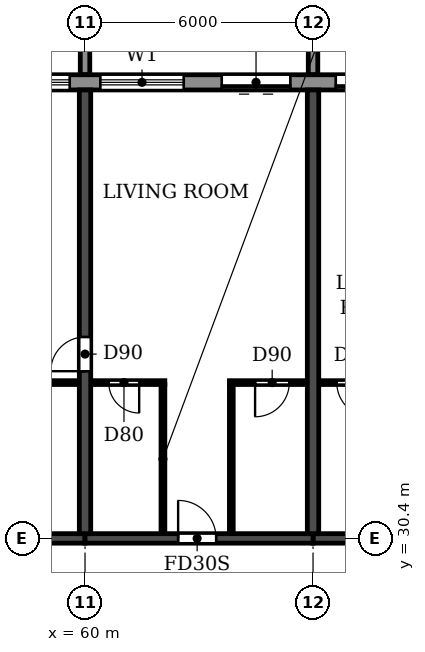
"""IFC4 building model, lengths in metres.
Left out: names, types, materials, properties, quantities, classifications, styles, units other than length and angle.
Written with IfcOpenShell. Run it as: python <this file> out.ifc"""

import sys

from ifc_helpers import new_model, si_unit, direction, frame, frame_2d, origin, place, context, subcontext, project, spatial, polyline, rectangle, outline, extrude, source, transform, mapped, element, fill, save


model = new_model("IFC4")
c1 = context("Model", 3, precision=1e-05, world=origin(), true_north=direction((0.0, 1.0)))
c2 = subcontext(c1, "Body", "Model", "MODEL_VIEW")
j1 = project(units=[si_unit("LENGTHUNIT", "METRE"), si_unit("PLANEANGLEUNIT", "RADIAN")], contexts=[c1])
p1 = place(None, origin())
s1 = spatial("IfcSite", under=j1, at=p1, CompositionType="ELEMENT")
p2 = place(p1, origin())
s2 = spatial("IfcBuilding", under=s1, at=p2, CompositionType="ELEMENT")
p3 = place(p2, frame((0.0, 0.0, 122.4)))
s3 = spatial("IfcBuildingStorey", under=s2, at=p3, CompositionType="ELEMENT", Elevation=122.4)
p4 = place(p3, frame((60.0, 30.525, 0.0), z_axis=(0.0, 0.0, 1.0), x_axis=(0.0, 1.0, 0.0)))
e1 = element("IfcWall", 1, at=p4, inside=s3, PredefinedType="SHEAR", context=c2, shape_type="SweptSolid", body=[
    extrude(rectangle(XDim=11.675, YDim=0.3, at=frame_2d((5.837, 0.0))), origin(), (0.0, 0.0, 1.0), 3.07),
])
p5 = place(p4, frame((4.275, 0.0, 0.0)))
e2 = element("IfcOpeningElement", 2, at=p5, cuts=e1, PredefinedType="OPENING", context=c2, shape_type="SweptSolid", body=[
    extrude(rectangle(XDim=0.9, YDim=2.1, at=frame_2d((0.45, 1.05))), frame((0.0, 0.16, 0.0), z_axis=(0.0, -1.0, 0.0), x_axis=(1.0, 0.0, 0.0)), (0.0, 0.0, 1.0), 0.32),
])
p6 = place(p3, frame((66.0, 30.525, 0.0), z_axis=(0.0, 0.0, 1.0), x_axis=(0.0, 1.0, 0.0)))
e3 = element("IfcWall", 3, at=p6, inside=s3, PredefinedType="SHEAR", context=c2, shape_type="SweptSolid", body=[
    extrude(rectangle(XDim=11.675, YDim=0.3, at=frame_2d((5.837, 0.0))), origin(), (0.0, 0.0, 1.0), 3.07),
])
p7 = place(p3, frame((54.0, 30.4, 0.0), z_axis=(0.0, 0.0, 1.0), x_axis=(1.0, 0.0, 0.0)))
e4 = element("IfcWall", 4, at=p7, inside=s3, PredefinedType="SHEAR", context=c2, shape_type="SweptSolid", body=[
    extrude(rectangle(XDim=6.0, YDim=0.25, at=frame_2d((3.0, 0.0))), origin(), (0.0, 0.0, 1.0), 2.47),
])
p8 = place(p3, frame((60.0, 30.4, 0.0), z_axis=(0.0, 0.0, 1.0), x_axis=(1.0, 0.0, 0.0)))
e5 = element("IfcWall", 5, at=p8, inside=s3, PredefinedType="SHEAR", context=c2, shape_type="SweptSolid", body=[
    extrude(rectangle(XDim=6.0, YDim=0.25, at=frame_2d((3.0, 0.0))), origin(), (0.0, 0.0, 1.0), 2.47),
])
p9 = place(p8, frame((2.45, 0.0, 0.0)))
e6 = element("IfcOpeningElement", 6, at=p9, cuts=e5, PredefinedType="OPENING", context=c2, shape_type="SweptSolid", body=[
    extrude(rectangle(XDim=1.0, YDim=2.1, at=frame_2d((0.5, 1.05))), frame((0.0, 0.135, 0.0), z_axis=(0.0, -1.0, 0.0), x_axis=(1.0, 0.0, 0.0)), (0.0, 0.0, 1.0), 0.27),
])
p10 = place(p3, frame((66.0, 30.4, 0.0), z_axis=(0.0, 0.0, 1.0), x_axis=(1.0, 0.0, 0.0)))
e7 = element("IfcWall", 7, at=p10, inside=s3, PredefinedType="SHEAR", context=c2, shape_type="SweptSolid", body=[
    extrude(rectangle(XDim=6.0, YDim=0.25, at=frame_2d((3.0, 0.0))), origin(), (0.0, 0.0, 1.0), 2.47),
])
p11 = place(p10, frame((2.55, 0.0, 0.0)))
e8 = element("IfcOpeningElement", 8, at=p11, cuts=e7, PredefinedType="OPENING", context=c2, shape_type="SweptSolid", body=[
    extrude(rectangle(XDim=1.0, YDim=2.1, at=frame_2d((0.5, 1.05))), frame((0.0, 0.135, 0.0), z_axis=(0.0, -1.0, 0.0), x_axis=(1.0, 0.0, 0.0)), (0.0, 0.0, 1.0), 0.27),
])
p12 = place(p3, frame((85.317, 42.4, 0.0), z_axis=(0.0, 0.0, 1.0), x_axis=(-1.0, 0.0, 0.0)))
e9 = element("IfcWall", 9, at=p12, inside=s3, PredefinedType="STANDARD", context=c2, shape_type="SweptSolid", body=[
    extrude(rectangle(XDim=68.634, YDim=0.4, at=frame_2d((34.317, 0.0))), origin(), (0.0, 0.0, 1.0), 3.07),
])
p13 = place(p12, frame((64.717, 0.0, 0.9)))
e10 = element("IfcOpeningElement", 10, at=p13, cuts=e9, PredefinedType="OPENING", context=c2, shape_type="SweptSolid", body=[
    extrude(rectangle(XDim=2.2, YDim=1.5, at=frame_2d((1.1, 0.75))), frame((0.0, 0.21, 0.0), z_axis=(0.0, -1.0, 0.0), x_axis=(1.0, 0.0, 0.0)), (0.0, 0.0, 1.0), 0.42),
])
p14 = place(p12, frame((61.917, 0.0, 0.0)))
e11 = element("IfcOpeningElement", 11, at=p14, cuts=e9, PredefinedType="OPENING", context=c2, shape_type="SweptSolid", body=[
    extrude(rectangle(XDim=1.8, YDim=2.4, at=frame_2d((0.9, 1.2))), frame((0.0, 0.21, 0.0), z_axis=(0.0, -1.0, 0.0), x_axis=(1.0, 0.0, 0.0)), (0.0, 0.0, 1.0), 0.42),
])
p15 = place(p12, frame((58.717, 0.0, 0.9)))
e12 = element("IfcOpeningElement", 12, at=p15, cuts=e9, PredefinedType="OPENING", context=c2, shape_type="SweptSolid", body=[
    extrude(rectangle(XDim=2.2, YDim=1.5, at=frame_2d((1.1, 0.75))), frame((0.0, 0.21, 0.0), z_axis=(0.0, -1.0, 0.0), x_axis=(1.0, 0.0, 0.0)), (0.0, 0.0, 1.0), 0.42),
])
p16 = place(p12, frame((55.917, 0.0, 0.0)))
e13 = element("IfcOpeningElement", 13, at=p16, cuts=e9, PredefinedType="OPENING", context=c2, shape_type="SweptSolid", body=[
    extrude(rectangle(XDim=1.8, YDim=2.4, at=frame_2d((0.9, 1.2))), frame((0.0, 0.21, 0.0), z_axis=(0.0, -1.0, 0.0), x_axis=(1.0, 0.0, 0.0)), (0.0, 0.0, 1.0), 0.42),
])
p17 = place(p12, frame((52.717, 0.0, 0.9)))
e14 = element("IfcOpeningElement", 14, at=p17, cuts=e9, PredefinedType="OPENING", context=c2, shape_type="SweptSolid", body=[
    extrude(rectangle(XDim=2.2, YDim=1.5, at=frame_2d((1.1, 0.75))), frame((0.0, 0.21, 0.0), z_axis=(0.0, -1.0, 0.0), x_axis=(1.0, 0.0, 0.0)), (0.0, 0.0, 1.0), 0.42),
])
p18 = place(p12, frame((49.917, 0.0, 0.0)))
e15 = element("IfcOpeningElement", 15, at=p18, cuts=e9, PredefinedType="OPENING", context=c2, shape_type="SweptSolid", body=[
    extrude(rectangle(XDim=1.8, YDim=2.4, at=frame_2d((0.9, 1.2))), frame((0.0, 0.21, 0.0), z_axis=(0.0, -1.0, 0.0), x_axis=(1.0, 0.0, 0.0)), (0.0, 0.0, 1.0), 0.42),
])
p19 = place(p12, frame((46.717, 0.0, 0.9)))
e16 = element("IfcOpeningElement", 16, at=p19, cuts=e9, PredefinedType="OPENING", context=c2, shape_type="SweptSolid", body=[
    extrude(rectangle(XDim=2.2, YDim=1.5, at=frame_2d((1.1, 0.75))), frame((0.0, 0.21, 0.0), z_axis=(0.0, -1.0, 0.0), x_axis=(1.0, 0.0, 0.0)), (0.0, 0.0, 1.0), 0.42),
])
p20 = place(p12, frame((43.917, 0.0, 0.0)))
e17 = element("IfcOpeningElement", 17, at=p20, cuts=e9, PredefinedType="OPENING", context=c2, shape_type="SweptSolid", body=[
    extrude(rectangle(XDim=1.8, YDim=2.4, at=frame_2d((0.9, 1.2))), frame((0.0, 0.21, 0.0), z_axis=(0.0, -1.0, 0.0), x_axis=(1.0, 0.0, 0.0)), (0.0, 0.0, 1.0), 0.42),
])
p21 = place(p12, frame((40.717, 0.0, 0.9)))
e18 = element("IfcOpeningElement", 18, at=p21, cuts=e9, PredefinedType="OPENING", context=c2, shape_type="SweptSolid", body=[
    extrude(rectangle(XDim=2.2, YDim=1.5, at=frame_2d((1.1, 0.75))), frame((0.0, 0.21, 0.0), z_axis=(0.0, -1.0, 0.0), x_axis=(1.0, 0.0, 0.0)), (0.0, 0.0, 1.0), 0.42),
])
p22 = place(p12, frame((37.717, 0.0, 0.9)))
e19 = element("IfcOpeningElement", 19, at=p22, cuts=e9, PredefinedType="OPENING", context=c2, shape_type="SweptSolid", body=[
    extrude(rectangle(XDim=2.2, YDim=1.5, at=frame_2d((1.1, 0.75))), frame((0.0, 0.21, 0.0), z_axis=(0.0, -1.0, 0.0), x_axis=(1.0, 0.0, 0.0)), (0.0, 0.0, 1.0), 0.42),
])
p23 = place(p12, frame((34.917, 0.0, 0.0)))
e20 = element("IfcOpeningElement", 20, at=p23, cuts=e9, PredefinedType="OPENING", context=c2, shape_type="SweptSolid", body=[
    extrude(rectangle(XDim=1.8, YDim=2.4, at=frame_2d((0.9, 1.2))), frame((0.0, 0.21, 0.0), z_axis=(0.0, -1.0, 0.0), x_axis=(1.0, 0.0, 0.0)), (0.0, 0.0, 1.0), 0.42),
])
p24 = place(p12, frame((31.717, 0.0, 0.9)))
e21 = element("IfcOpeningElement", 21, at=p24, cuts=e9, PredefinedType="OPENING", context=c2, shape_type="SweptSolid", body=[
    extrude(rectangle(XDim=2.2, YDim=1.5, at=frame_2d((1.1, 0.75))), frame((0.0, 0.21, 0.0), z_axis=(0.0, -1.0, 0.0), x_axis=(1.0, 0.0, 0.0)), (0.0, 0.0, 1.0), 0.42),
])
p25 = place(p12, frame((28.717, 0.0, 0.9)))
e22 = element("IfcOpeningElement", 22, at=p25, cuts=e9, PredefinedType="OPENING", context=c2, shape_type="SweptSolid", body=[
    extrude(rectangle(XDim=2.2, YDim=1.5, at=frame_2d((1.1, 0.75))), frame((0.0, 0.21, 0.0), z_axis=(0.0, -1.0, 0.0), x_axis=(1.0, 0.0, 0.0)), (0.0, 0.0, 1.0), 0.42),
])
p26 = place(p12, frame((25.717, 0.0, 0.9)))
e23 = element("IfcOpeningElement", 23, at=p26, cuts=e9, PredefinedType="OPENING", context=c2, shape_type="SweptSolid", body=[
    extrude(rectangle(XDim=2.2, YDim=1.5, at=frame_2d((1.1, 0.75))), frame((0.0, 0.21, 0.0), z_axis=(0.0, -1.0, 0.0), x_axis=(1.0, 0.0, 0.0)), (0.0, 0.0, 1.0), 0.42),
])
p27 = place(p12, frame((22.717, 0.0, 0.9)))
e24 = element("IfcOpeningElement", 24, at=p27, cuts=e9, PredefinedType="OPENING", context=c2, shape_type="SweptSolid", body=[
    extrude(rectangle(XDim=2.2, YDim=1.5, at=frame_2d((1.1, 0.75))), frame((0.0, 0.21, 0.0), z_axis=(0.0, -1.0, 0.0), x_axis=(1.0, 0.0, 0.0)), (0.0, 0.0, 1.0), 0.42),
])
p28 = place(p12, frame((19.917, 0.0, 0.0)))
e25 = element("IfcOpeningElement", 25, at=p28, cuts=e9, PredefinedType="OPENING", context=c2, shape_type="SweptSolid", body=[
    extrude(rectangle(XDim=1.8, YDim=2.4, at=frame_2d((0.9, 1.2))), frame((0.0, 0.21, 0.0), z_axis=(0.0, -1.0, 0.0), x_axis=(1.0, 0.0, 0.0)), (0.0, 0.0, 1.0), 0.42),
])
p29 = place(p12, frame((16.917, 0.0, 0.0)))
e26 = element("IfcOpeningElement", 26, at=p29, cuts=e9, PredefinedType="OPENING", context=c2, shape_type="SweptSolid", body=[
    extrude(rectangle(XDim=1.8, YDim=2.4, at=frame_2d((0.9, 1.2))), frame((0.0, 0.21, 0.0), z_axis=(0.0, -1.0, 0.0), x_axis=(1.0, 0.0, 0.0)), (0.0, 0.0, 1.0), 0.42),
])
p30 = place(p12, frame((13.717, 0.0, 0.9)))
e27 = element("IfcOpeningElement", 27, at=p30, cuts=e9, PredefinedType="OPENING", context=c2, shape_type="SweptSolid", body=[
    extrude(rectangle(XDim=2.2, YDim=1.5, at=frame_2d((1.1, 0.75))), frame((0.0, 0.21, 0.0), z_axis=(0.0, -1.0, 0.0), x_axis=(1.0, 0.0, 0.0)), (0.0, 0.0, 1.0), 0.42),
])
p31 = place(p12, frame((10.717, 0.0, 0.9)))
e28 = element("IfcOpeningElement", 28, at=p31, cuts=e9, PredefinedType="OPENING", context=c2, shape_type="SweptSolid", body=[
    extrude(rectangle(XDim=2.2, YDim=1.5, at=frame_2d((1.1, 0.75))), frame((0.0, 0.21, 0.0), z_axis=(0.0, -1.0, 0.0), x_axis=(1.0, 0.0, 0.0)), (0.0, 0.0, 1.0), 0.42),
])
p32 = place(p12, frame((7.717, 0.0, 0.9)))
e29 = element("IfcOpeningElement", 29, at=p32, cuts=e9, PredefinedType="OPENING", context=c2, shape_type="SweptSolid", body=[
    extrude(rectangle(XDim=2.2, YDim=1.5, at=frame_2d((1.1, 0.75))), frame((0.0, 0.21, 0.0), z_axis=(0.0, -1.0, 0.0), x_axis=(1.0, 0.0, 0.0)), (0.0, 0.0, 1.0), 0.42),
])
p33 = place(p12, frame((4.917, 0.0, 0.0)))
e30 = element("IfcOpeningElement", 30, at=p33, cuts=e9, PredefinedType="OPENING", context=c2, shape_type="SweptSolid", body=[
    extrude(rectangle(XDim=1.8, YDim=2.4, at=frame_2d((0.9, 1.2))), frame((0.0, 0.21, 0.0), z_axis=(0.0, -1.0, 0.0), x_axis=(1.0, 0.0, 0.0)), (0.0, 0.0, 1.0), 0.42),
])
p34 = place(p12, frame((1.717, 0.0, 0.9)))
e31 = element("IfcOpeningElement", 31, at=p34, cuts=e9, PredefinedType="OPENING", context=c2, shape_type="SweptSolid", body=[
    extrude(rectangle(XDim=2.2, YDim=1.5, at=frame_2d((1.1, 0.75))), frame((0.0, 0.21, 0.0), z_axis=(0.0, -1.0, 0.0), x_axis=(1.0, 0.0, 0.0)), (0.0, 0.0, 1.0), 0.42),
])
m1 = source(origin(), c2, "Body", "SweptSolid", [
    extrude(outline(polyline([(0.0, 0.0), (0.25, 0.0), (0.25, 3.1), (0.0, 3.1), (0.0, 0.0)])), origin(), (0.0, 0.0, 1.0), 3.1),
])
for number, where in (
    (32, (59.875, 42.6, 0.0)),
    (33, (65.875, 42.6, 0.0)),
):
    element("IfcWall", number, at=place(p3, frame(where)), inside=s3, PredefinedType="STANDARD", context=c2, shape_type="MappedRepresentation", body=[
        mapped(m1, transform((0.0, 0.0, 0.0))),
    ])
p35 = place(p3, frame((57.1, 34.5, 0.0), z_axis=(0.0, 0.0, 1.0), x_axis=(1.0, 0.0, 0.0)))
e34 = element("IfcWall", 34, at=p35, inside=s3, PredefinedType="PARTITIONING", context=c2, shape_type="SweptSolid", body=[
    extrude(rectangle(XDim=2.74, YDim=0.1, at=frame_2d((1.37, 0.0))), origin(), (0.0, 0.0, 1.0), 3.07),
])
p36 = place(p35, frame((1.0, 0.0, 0.0)))
e35 = element("IfcOpeningElement", 35, at=p36, cuts=e34, PredefinedType="OPENING", context=c2, shape_type="SweptSolid", body=[
    extrude(rectangle(XDim=0.8, YDim=2.1, at=frame_2d((0.4, 1.05))), frame((0.0, 0.06, 0.0), z_axis=(0.0, -1.0, 0.0), x_axis=(1.0, 0.0, 0.0)), (0.0, 0.0, 1.0), 0.12),
])
p37 = place(p3, frame((60.16, 34.5, 0.0), z_axis=(0.0, 0.0, 1.0), x_axis=(1.0, 0.0, 0.0)))
e36 = element("IfcWall", 36, at=p37, inside=s3, PredefinedType="PARTITIONING", context=c2, shape_type="SweptSolid", body=[
    extrude(rectangle(XDim=1.94, YDim=0.1, at=frame_2d((0.97, 0.0))), origin(), (0.0, 0.0, 1.0), 3.07),
])
p38 = place(p37, frame((0.465, 0.0, 0.0)))
e37 = element("IfcOpeningElement", 37, at=p38, cuts=e36, PredefinedType="OPENING", context=c2, shape_type="SweptSolid", body=[
    extrude(rectangle(XDim=0.8, YDim=2.1, at=frame_2d((0.4, 1.05))), frame((0.0, 0.06, 0.0), z_axis=(0.0, -1.0, 0.0), x_axis=(1.0, 0.0, 0.0)), (0.0, 0.0, 1.0), 0.12),
])
p39 = place(p3, frame((63.8, 34.5, 0.0), z_axis=(0.0, 0.0, 1.0), x_axis=(1.0, 0.0, 0.0)))
e38 = element("IfcWall", 38, at=p39, inside=s3, PredefinedType="PARTITIONING", context=c2, shape_type="SweptSolid", body=[
    extrude(rectangle(XDim=2.04, YDim=0.1, at=frame_2d((1.02, 0.0))), origin(), (0.0, 0.0, 1.0), 3.07),
])
p40 = place(p39, frame((0.675, 0.0, 0.0)))
e39 = element("IfcOpeningElement", 39, at=p40, cuts=e38, PredefinedType="OPENING", context=c2, shape_type="SweptSolid", body=[
    extrude(rectangle(XDim=0.9, YDim=2.1, at=frame_2d((0.45, 1.05))), frame((0.0, 0.06, 0.0), z_axis=(0.0, -1.0, 0.0), x_axis=(1.0, 0.0, 0.0)), (0.0, 0.0, 1.0), 0.12),
])
p41 = place(p3, frame((66.16, 34.5, 0.0), z_axis=(0.0, 0.0, 1.0), x_axis=(1.0, 0.0, 0.0)))
e40 = element("IfcWall", 40, at=p41, inside=s3, PredefinedType="PARTITIONING", context=c2, shape_type="SweptSolid", body=[
    extrude(rectangle(XDim=2.04, YDim=0.1, at=frame_2d((1.02, 0.0))), origin(), (0.0, 0.0, 1.0), 3.07),
])
p42 = place(p41, frame((0.465, 0.0, 0.0)))
e41 = element("IfcOpeningElement", 41, at=p42, cuts=e40, PredefinedType="OPENING", context=c2, shape_type="SweptSolid", body=[
    extrude(rectangle(XDim=0.9, YDim=2.1, at=frame_2d((0.45, 1.05))), frame((0.0, 0.06, 0.0), z_axis=(0.0, -1.0, 0.0), x_axis=(1.0, 0.0, 0.0)), (0.0, 0.0, 1.0), 0.12),
])
for number, where, z_axis, x_axis in (
    (42, (62.05, 30.535, 0.0), (0.0, 0.0, 1.0), (0.0, 1.0, 0.0)),
    (43, (63.85, 30.535, 0.0), (0.0, 0.0, 1.0), (0.0, 1.0, 0.0)),
):
    element("IfcWall", number, at=place(p3, frame(where, z_axis=z_axis, x_axis=x_axis)), inside=s3, PredefinedType="PARTITIONING", context=c2, shape_type="SweptSolid", body=[
        extrude(rectangle(XDim=3.915, YDim=0.1, at=frame_2d((1.958, 0.0))), origin(), (0.0, 0.0, 1.0), 3.07),
    ])
p43 = place(p26, origin())
e44 = element("IfcWindow", 44, at=p43, inside=s3, PartitioningType="DOUBLE_PANEL_HORIZONTAL", PredefinedType="WINDOW", context=c2, shape_type="SweptSolid", body=[
    extrude(rectangle(XDim=2.2, YDim=1.5, at=frame_2d((1.1, 0.75))), frame((0.0, 0.03, 0.0), z_axis=(0.0, -1.0, 0.0), x_axis=(1.0, 0.0, 0.0)), (0.0, 0.0, 1.0), 0.06),
])
fill(e23, e44)
p44 = place(p27, origin())
e45 = element("IfcWindow", 45, at=p44, inside=s3, PartitioningType="DOUBLE_PANEL_HORIZONTAL", PredefinedType="WINDOW", context=c2, shape_type="SweptSolid", body=[
    extrude(rectangle(XDim=2.2, YDim=1.5, at=frame_2d((1.1, 0.75))), frame((0.0, 0.03, 0.0), z_axis=(0.0, -1.0, 0.0), x_axis=(1.0, 0.0, 0.0)), (0.0, 0.0, 1.0), 0.06),
])
fill(e24, e45)
p45 = place(p28, origin())
e46 = element("IfcDoor", 46, at=p45, inside=s3, OperationType="DOUBLE_DOOR_SLIDING", PredefinedType="DOOR", context=c2, shape_type="SweptSolid", body=[
    extrude(rectangle(XDim=1.8, YDim=2.4, at=frame_2d((0.9, 1.2))), frame((0.0, 0.025, 0.0), z_axis=(0.0, -1.0, 0.0), x_axis=(1.0, 0.0, 0.0)), (0.0, 0.0, 1.0), 0.05),
])
fill(e25, e46)
p46 = place(p29, origin())
e47 = element("IfcDoor", 47, at=p46, inside=s3, OperationType="DOUBLE_DOOR_SLIDING", PredefinedType="DOOR", context=c2, shape_type="SweptSolid", body=[
    extrude(rectangle(XDim=1.8, YDim=2.4, at=frame_2d((0.9, 1.2))), frame((0.0, 0.025, 0.0), z_axis=(0.0, -1.0, 0.0), x_axis=(1.0, 0.0, 0.0)), (0.0, 0.0, 1.0), 0.05),
])
fill(e26, e47)
p47 = place(p5, origin())
e48 = element("IfcDoor", 48, at=p47, inside=s3, OperationType="SINGLE_SWING_LEFT", PredefinedType="DOOR", context=c2, shape_type="SweptSolid", body=[
    extrude(rectangle(XDim=0.9, YDim=2.1, at=frame_2d((0.45, 1.05))), frame((0.0, 0.025, 0.0), z_axis=(0.0, -1.0, 0.0), x_axis=(1.0, 0.0, 0.0)), (0.0, 0.0, 1.0), 0.05),
])
fill(e2, e48)
p48 = place(p38, frame((0.8, 0.0, 0.0), z_axis=(0.0, 0.0, 1.0), x_axis=(-1.0, 0.0, 0.0)))
e49 = element("IfcDoor", 49, at=p48, inside=s3, OperationType="SINGLE_SWING_LEFT", PredefinedType="DOOR", context=c2, shape_type="SweptSolid", body=[
    extrude(rectangle(XDim=0.8, YDim=2.1, at=frame_2d((0.4, 1.05))), frame((0.0, 0.025, 0.0), z_axis=(0.0, -1.0, 0.0), x_axis=(1.0, 0.0, 0.0)), (0.0, 0.0, 1.0), 0.05),
])
fill(e37, e49)
p49 = place(p9, origin())
e50 = element("IfcDoor", 50, at=p49, inside=s3, OperationType="SINGLE_SWING_LEFT", PredefinedType="DOOR", context=c2, shape_type="SweptSolid", body=[
    extrude(rectangle(XDim=1.0, YDim=2.1, at=frame_2d((0.5, 1.05))), frame((0.0, 0.025, 0.0), z_axis=(0.0, -1.0, 0.0), x_axis=(1.0, 0.0, 0.0)), (0.0, 0.0, 1.0), 0.05),
])
fill(e6, e50)
p50 = place(p40, frame((0.9, 0.0, 0.0), z_axis=(0.0, 0.0, 1.0), x_axis=(-1.0, 0.0, 0.0)))
e51 = element("IfcDoor", 51, at=p50, inside=s3, OperationType="SINGLE_SWING_RIGHT", PredefinedType="DOOR", context=c2, shape_type="SweptSolid", body=[
    extrude(rectangle(XDim=0.9, YDim=2.1, at=frame_2d((0.45, 1.05))), frame((0.0, 0.025, 0.0), z_axis=(0.0, -1.0, 0.0), x_axis=(1.0, 0.0, 0.0)), (0.0, 0.0, 1.0), 0.05),
])
fill(e39, e51)
p51 = place(p42, frame((0.9, 0.0, 0.0), z_axis=(0.0, 0.0, 1.0), x_axis=(-1.0, 0.0, 0.0)))
e52 = element("IfcDoor", 52, at=p51, inside=s3, OperationType="SINGLE_SWING_LEFT", PredefinedType="DOOR", context=c2, shape_type="SweptSolid", body=[
    extrude(rectangle(XDim=0.9, YDim=2.1, at=frame_2d((0.45, 1.05))), frame((0.0, 0.025, 0.0), z_axis=(0.0, -1.0, 0.0), x_axis=(1.0, 0.0, 0.0)), (0.0, 0.0, 1.0), 0.05),
])
fill(e41, e52)
save(model, sys.argv[1])
